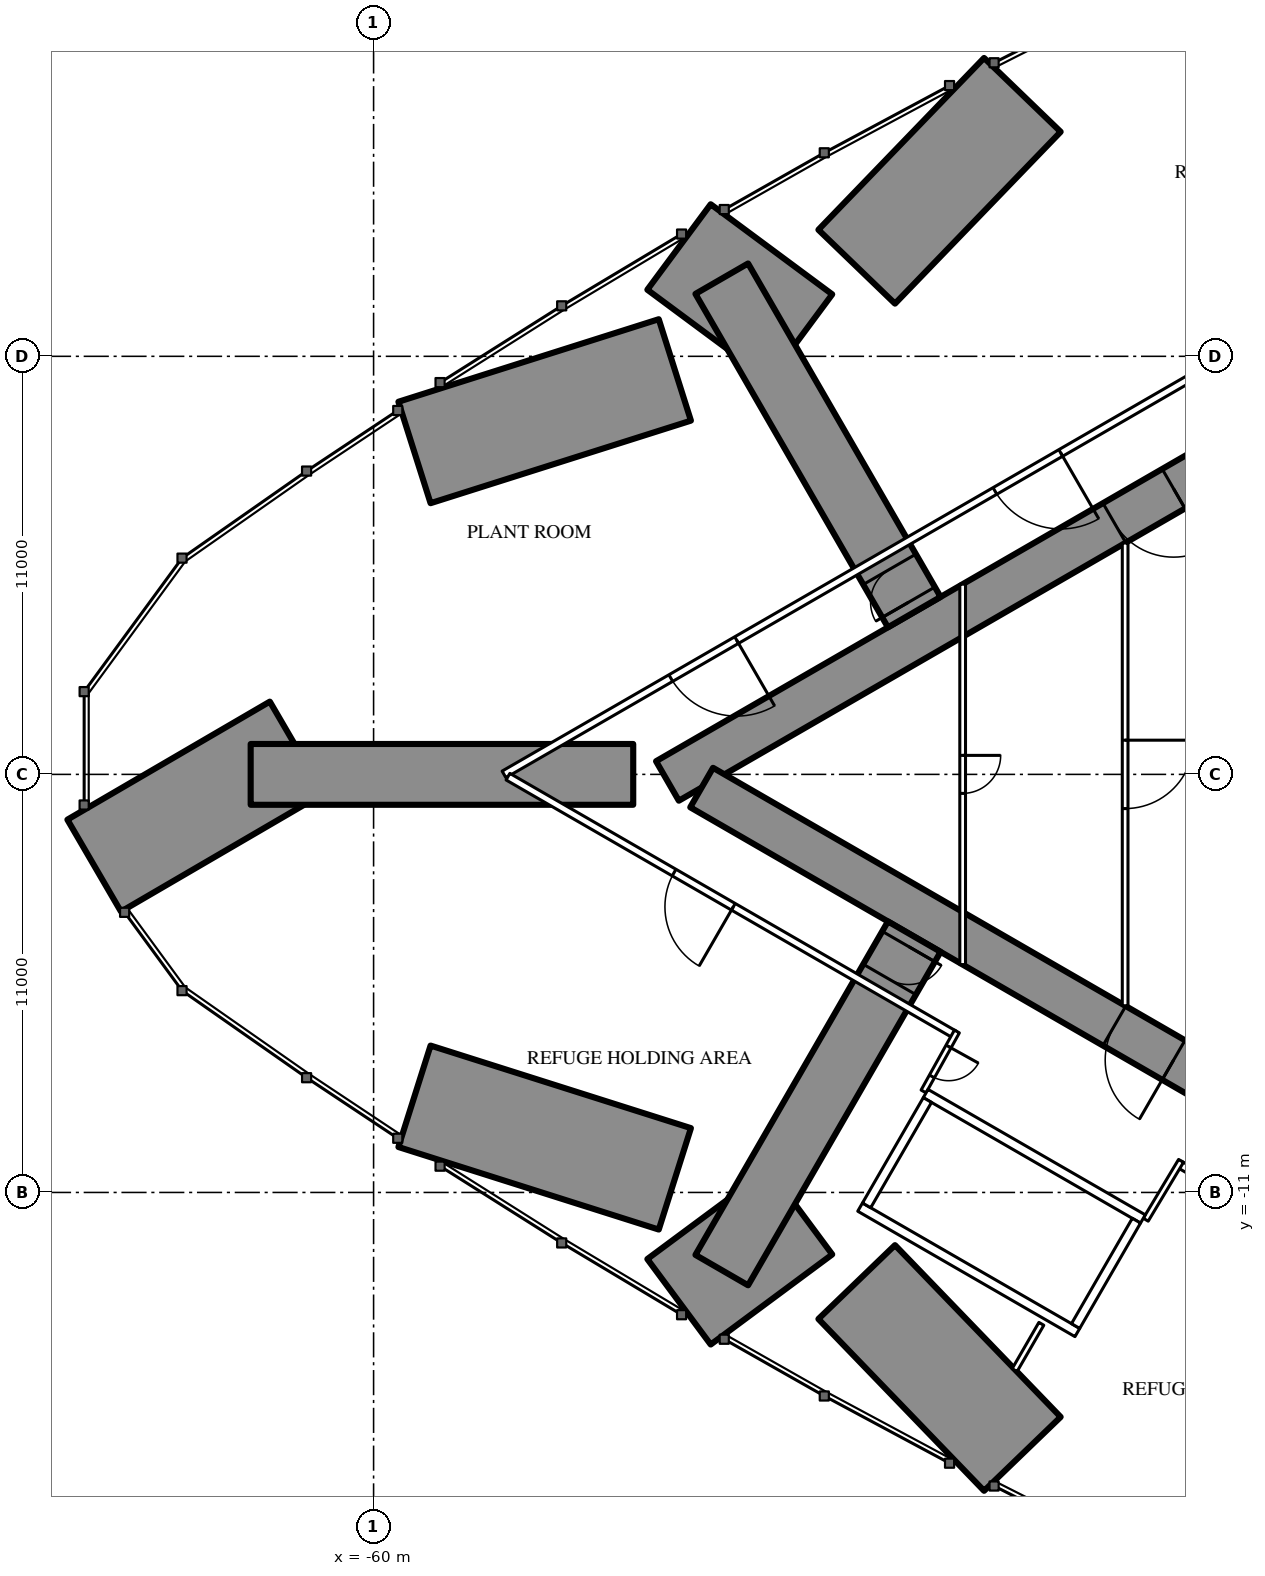
"""IFC4 building model, lengths in metres.
Left out: names, types, materials, properties, quantities, classifications, styles, units other than length and angle.
Written with IfcOpenShell. Run it as: python <this file> out.ifc"""

import sys

from ifc_helpers import new_model, si_unit, direction, frame, frame_2d, origin, place, context, subcontext, project, spatial, rectangle, extrude, element, fill, save


model = new_model("IFC4")
c1 = context("Model", 3, precision=1e-05, world=origin(), true_north=direction((0.0, 1.0)))
c2 = subcontext(c1, "Body", "Model", "MODEL_VIEW")
j1 = project(units=[si_unit("LENGTHUNIT", "METRE"), si_unit("PLANEANGLEUNIT", "RADIAN")], contexts=[c1])
p1 = place(None, origin())
s1 = spatial("IfcSite", under=j1, at=p1, CompositionType="ELEMENT")
p2 = place(p1, origin())
s2 = spatial("IfcBuilding", under=s1, at=p2, CompositionType="ELEMENT")
p3 = place(p2, frame((0.0, 0.0, 205.3)))
s3 = spatial("IfcBuildingStorey", under=s2, at=p3, CompositionType="ELEMENT", Elevation=205.3)
p4 = place(p3, frame((-67.352, -2.4, 0.0), z_axis=(0.0, 0.0, 1.0), x_axis=(0.863922467906, 0.503624830054, 0.0)))
e1 = element("IfcWall", 1, at=p4, inside=s3, PredefinedType="SHEAR", context=c2, shape_type="SweptSolid", body=[
    extrude(rectangle(XDim=6.166, YDim=2.8, at=frame_2d((3.083, 0.0))), origin(), (0.0, 0.0, 1.0), 5.0),
])
p5 = place(p3, frame((-58.924, -8.47, 0.0), z_axis=(0.0, 0.0, 1.0), x_axis=(0.953237559777, -0.302222028698, 0.0)))
e2 = element("IfcWall", 2, at=p5, inside=s3, PredefinedType="SHEAR", context=c2, shape_type="SweptSolid", body=[
    extrude(rectangle(XDim=7.187, YDim=2.8, at=frame_2d((3.594, 0.0))), origin(), (0.0, 0.0, 1.0), 5.0),
])
p6 = place(p3, frame((-51.964, -13.877, 0.0), z_axis=(0.0, 0.0, 1.0), x_axis=(0.80337247009, 0.595476846151, 0.0)))
e3 = element("IfcWall", 3, at=p6, inside=s3, PredefinedType="SHEAR", context=c2, shape_type="SweptSolid", body=[
    extrude(rectangle(XDim=3.981, YDim=2.8, at=frame_2d((1.99, 0.0))), origin(), (0.0, 0.0, 1.0), 5.0),
])
for number, where, z_axis, x_axis in (
    (4, (-42.929, -17.879, 0.0), (0.0, 0.0, 1.0), (-0.694, 0.72, 0.0)),
    (5, (-42.929, 17.879, 0.0), (0.0, 0.0, 1.0), (-0.694, -0.72, 0.0)),
):
    element("IfcWall", number, at=place(p3, frame(where, z_axis=z_axis, x_axis=x_axis)), inside=s3, PredefinedType="SHEAR", context=c2, shape_type="SweptSolid", body=[
        extrude(rectangle(XDim=6.281, YDim=2.8, at=frame_2d((3.141, 0.0))), origin(), (0.0, 0.0, 1.0), 5.0),
    ])
p7 = place(p3, frame((-51.964, 13.877, 0.0), z_axis=(0.0, 0.0, 1.0), x_axis=(0.80337247009, -0.595476846151, 0.0)))
e6 = element("IfcWall", 6, at=p7, inside=s3, PredefinedType="SHEAR", context=c2, shape_type="SweptSolid", body=[
    extrude(rectangle(XDim=3.981, YDim=2.8, at=frame_2d((1.99, 0.0))), origin(), (0.0, 0.0, 1.0), 5.0),
])
p8 = place(p3, frame((-58.924, 8.47, 0.0), z_axis=(0.0, 0.0, 1.0), x_axis=(0.953237559777, 0.302222028698, 0.0)))
e7 = element("IfcWall", 7, at=p8, inside=s3, PredefinedType="SHEAR", context=c2, shape_type="SweptSolid", body=[
    extrude(rectangle(XDim=7.187, YDim=2.8, at=frame_2d((3.594, 0.0))), origin(), (0.0, 0.0, 1.0), 5.0),
])
p9 = place(p3, frame((-27.2, 14.3, 0.0), z_axis=(0.0, 0.0, 1.0), x_axis=(-0.866026593062, -0.499997940104, 0.0)))
e8 = element("IfcWall", 8, at=p9, inside=s3, PredefinedType="SHEAR", context=c2, shape_type="SweptSolid", body=[
    extrude(rectangle(XDim=28.946, YDim=1.2, at=frame_2d((14.473, 0.0))), origin(), (0.0, 0.0, 1.0), 5.0),
])
p10 = place(p9, frame((6.5, 0.0, 0.0)))
e9 = element("IfcOpeningElement", 9, at=p10, cuts=e8, PredefinedType="OPENING", context=c2, shape_type="SweptSolid", body=[
    extrude(rectangle(XDim=1.0, YDim=2.2, at=frame_2d((0.5, 1.1))), frame((0.0, 0.61, 0.0), z_axis=(0.0, -1.0, 0.0), x_axis=(1.0, 0.0, 0.0)), (0.0, 0.0, 1.0), 1.22),
])
p11 = place(p9, frame((13.568, 0.0, 0.0)))
e10 = element("IfcOpeningElement", 10, at=p11, cuts=e8, PredefinedType="OPENING", context=c2, shape_type="SweptSolid", body=[
    extrude(rectangle(XDim=1.8, YDim=2.2, at=frame_2d((0.9, 1.1))), frame((0.0, 0.61, 0.0), z_axis=(0.0, -1.0, 0.0), x_axis=(1.0, 0.0, 0.0)), (0.0, 0.0, 1.0), 1.22),
])
p12 = place(p3, frame((-27.2, -14.3, 0.0), z_axis=(0.0, 0.0, 1.0), x_axis=(-0.866024021859, 0.500002393557, 0.0)))
e11 = element("IfcWall", 11, at=p12, inside=s3, PredefinedType="SHEAR", context=c2, shape_type="SweptSolid", body=[
    extrude(rectangle(XDim=27.907, YDim=1.2, at=frame_2d((13.954, 0.0))), origin(), (0.0, 0.0, 1.0), 5.0),
])
p13 = place(p12, frame((6.5, 0.0, 0.0)))
e12 = element("IfcOpeningElement", 12, at=p13, cuts=e11, PredefinedType="OPENING", context=c2, shape_type="SweptSolid", body=[
    extrude(rectangle(XDim=1.0, YDim=2.2, at=frame_2d((0.5, 1.1))), frame((0.0, 0.61, 0.0), z_axis=(0.0, -1.0, 0.0), x_axis=(1.0, 0.0, 0.0)), (0.0, 0.0, 1.0), 1.22),
])
p14 = place(p12, frame((13.568, 0.0, 0.0)))
e13 = element("IfcOpeningElement", 13, at=p14, cuts=e11, PredefinedType="OPENING", context=c2, shape_type="SweptSolid", body=[
    extrude(rectangle(XDim=1.8, YDim=2.2, at=frame_2d((0.9, 1.1))), frame((0.0, 0.61, 0.0), z_axis=(0.0, -1.0, 0.0), x_axis=(1.0, 0.0, 0.0)), (0.0, 0.0, 1.0), 1.22),
])
p15 = place(p3, frame((-45.773, 4.27, 0.0), z_axis=(0.0, 0.0, 1.0), x_axis=(-0.499995723283, 0.866027872934, 0.0)))
e14 = element("IfcWall", 14, at=p15, inside=s3, PredefinedType="SHEAR", context=c2, shape_type="SweptSolid", body=[
    extrude(rectangle(XDim=10.131, YDim=1.6, at=frame_2d((5.065, 0.0))), origin(), (0.0, 0.0, 1.0), 5.0),
])
p16 = place(p15, frame((0.3, 0.0, 0.0)))
e15 = element("IfcOpeningElement", 15, at=p16, cuts=e14, PredefinedType="OPENING", context=c2, shape_type="SweptSolid", body=[
    extrude(rectangle(XDim=1.0, YDim=2.2, at=frame_2d((0.5, 1.1))), frame((0.0, 0.81, 0.0), z_axis=(0.0, -1.0, 0.0), x_axis=(1.0, 0.0, 0.0)), (0.0, 0.0, 1.0), 1.62),
])
p17 = place(p3, frame((-53.168, 0.0, 0.0), z_axis=(0.0, 0.0, 1.0), x_axis=(-1.0, 0.0, 0.0)))
e16 = element("IfcWall", 16, at=p17, inside=s3, PredefinedType="SHEAR", context=c2, shape_type="SweptSolid", body=[
    extrude(rectangle(XDim=10.066, YDim=1.6, at=frame_2d((5.033, 0.0))), origin(), (0.0, 0.0, 1.0), 5.0),
])
p18 = place(p3, frame((-45.773, -4.27, 0.0), z_axis=(0.0, 0.0, 1.0), x_axis=(-0.499995723283, -0.866027872934, 0.0)))
e17 = element("IfcWall", 17, at=p18, inside=s3, PredefinedType="SHEAR", context=c2, shape_type="SweptSolid", body=[
    extrude(rectangle(XDim=10.131, YDim=1.6, at=frame_2d((5.065, 0.0))), origin(), (0.0, 0.0, 1.0), 5.0),
])
p19 = place(p18, frame((0.3, 0.0, 0.0)))
e18 = element("IfcOpeningElement", 18, at=p19, cuts=e17, PredefinedType="OPENING", context=c2, shape_type="SweptSolid", body=[
    extrude(rectangle(XDim=1.0, YDim=2.2, at=frame_2d((0.5, 1.1))), frame((0.0, 0.81, 0.0), z_axis=(0.0, -1.0, 0.0), x_axis=(1.0, 0.0, 0.0)), (0.0, 0.0, 1.0), 1.62),
])
p20 = place(p3, frame((-27.86, 16.575, 0.0), z_axis=(0.0, 0.0, 1.0), x_axis=(-0.866025533911, -0.499999774615, 0.0)))
e19 = element("IfcWall", 19, at=p20, inside=s3, PredefinedType="PARTITIONING", context=c2, shape_type="SweptSolid", body=[
    extrude(rectangle(XDim=33.149, YDim=0.2, at=frame_2d((16.575, 0.0))), origin(), (0.0, 0.0, 1.0), 4.75),
])
p21 = place(p20, frame((6.051, 0.0, 0.0)))
e20 = element("IfcOpeningElement", 20, at=p21, cuts=e19, PredefinedType="OPENING", context=c2, shape_type="SweptSolid", body=[
    extrude(rectangle(XDim=1.8, YDim=2.2, at=frame_2d((0.9, 1.1))), frame((0.0, 0.11, 0.0), z_axis=(0.0, -1.0, 0.0), x_axis=(1.0, 0.0, 0.0)), (0.0, 0.0, 1.0), 0.22),
])
p22 = place(p20, frame((16.234, 0.0, 0.0)))
e21 = element("IfcOpeningElement", 21, at=p22, cuts=e19, PredefinedType="OPENING", context=c2, shape_type="SweptSolid", body=[
    extrude(rectangle(XDim=2.0, YDim=2.4, at=frame_2d((1.0, 1.2))), frame((0.0, 0.11, 0.0), z_axis=(0.0, -1.0, 0.0), x_axis=(1.0, 0.0, 0.0)), (0.0, 0.0, 1.0), 0.22),
])
p23 = place(p20, frame((26.082, 0.0, 0.0)))
e22 = element("IfcOpeningElement", 22, at=p23, cuts=e19, PredefinedType="OPENING", context=c2, shape_type="SweptSolid", body=[
    extrude(rectangle(XDim=2.0, YDim=2.4, at=frame_2d((1.0, 1.2))), frame((0.0, 0.11, 0.0), z_axis=(0.0, -1.0, 0.0), x_axis=(1.0, 0.0, 0.0)), (0.0, 0.0, 1.0), 0.22),
])
p24 = place(p3, frame((-42.429, -14.457, 0.0), z_axis=(0.0, 0.0, 1.0), x_axis=(-0.5000578829, -0.865991982497, 0.0)))
e23 = element("IfcWall", 23, at=p24, inside=s3, PredefinedType="PARTITIONING", context=c2, shape_type="SweptSolid", body=[
    extrude(rectangle(XDim=1.407, YDim=0.15, at=frame_2d((0.704, 0.0))), origin(), (0.0, 0.0, 1.0), 4.75),
])
p25 = place(p3, frame((-27.86, -16.575, 0.0), z_axis=(0.0, 0.0, 1.0), x_axis=(-0.866027756871, 0.499995924312, 0.0)))
e24 = element("IfcWall", 24, at=p25, inside=s3, PredefinedType="PARTITIONING", context=c2, shape_type="SweptSolid", body=[
    extrude(rectangle(XDim=12.622, YDim=0.2, at=frame_2d((6.311, 0.0))), origin(), (0.0, 0.0, 1.0), 4.75),
])
p26 = place(p25, frame((5.411, 0.0, 0.0)))
e25 = element("IfcOpeningElement", 25, at=p26, cuts=e24, PredefinedType="OPENING", context=c2, shape_type="SweptSolid", body=[
    extrude(rectangle(XDim=1.8, YDim=2.2, at=frame_2d((0.9, 1.1))), frame((0.0, 0.11, 0.0), z_axis=(0.0, -1.0, 0.0), x_axis=(1.0, 0.0, 0.0)), (0.0, 0.0, 1.0), 0.22),
])
p27 = place(p3, frame((-44.715, -6.844, 0.0), z_axis=(0.0, 0.0, 1.0), x_axis=(-0.866025261224, 0.500000246922, 0.0)))
e26 = element("IfcWall", 26, at=p27, inside=s3, PredefinedType="PARTITIONING", context=c2, shape_type="SweptSolid", body=[
    extrude(rectangle(XDim=13.567, YDim=0.2, at=frame_2d((6.783, 0.0))), origin(), (0.0, 0.0, 1.0), 4.75),
])
p28 = place(p27, frame((6.719, 0.0, 0.0)))
e27 = element("IfcOpeningElement", 27, at=p28, cuts=e26, PredefinedType="OPENING", context=c2, shape_type="SweptSolid", body=[
    extrude(rectangle(XDim=1.8, YDim=2.2, at=frame_2d((0.9, 1.1))), frame((0.0, 0.11, 0.0), z_axis=(0.0, -1.0, 0.0), x_axis=(1.0, 0.0, 0.0)), (0.0, 0.0, 1.0), 0.22),
])
p29 = place(p3, frame((-44.652, -6.764, 0.0), z_axis=(0.0, 0.0, 1.0), x_axis=(-0.485528096672, -0.8742210632, 0.0)))
e28 = element("IfcWall", 28, at=p29, inside=s3, PredefinedType="PARTITIONING", context=c2, shape_type="SweptSolid", body=[
    extrude(rectangle(XDim=1.805, YDim=0.15, at=frame_2d((0.903, 0.0))), origin(), (0.0, 0.0, 1.0), 4.75),
])
p30 = place(p29, frame((0.453, 0.0, 0.0)))
e29 = element("IfcOpeningElement", 29, at=p30, cuts=e28, PredefinedType="OPENING", context=c2, shape_type="SweptSolid", body=[
    extrude(rectangle(XDim=0.9, YDim=2.2, at=frame_2d((0.45, 1.1))), frame((0.0, 0.085, 0.0), z_axis=(0.0, -1.0, 0.0), x_axis=(1.0, 0.0, 0.0)), (0.0, 0.0, 1.0), 0.17),
])
p31 = place(p3, frame((-39.683, -11.718, 0.0), z_axis=(0.0, 0.0, 1.0), x_axis=(0.514336634837, 0.857588377991, 0.0)))
e30 = element("IfcWall", 30, at=p31, inside=s3, PredefinedType="PARTITIONING", context=c2, shape_type="SweptSolid", body=[
    extrude(rectangle(XDim=1.805, YDim=0.15, at=frame_2d((0.903, 0.0))), origin(), (0.0, 0.0, 1.0), 4.75),
])
p32 = place(p3, frame((-40.225, 6.087, 0.0), z_axis=(0.0, 0.0, 1.0), x_axis=(0.0, -1.0, 0.0)))
e31 = element("IfcWall", 31, at=p32, inside=s3, PredefinedType="PARTITIONING", context=c2, shape_type="SweptSolid", body=[
    extrude(rectangle(XDim=12.174, YDim=0.15, at=frame_2d((6.087, 0.0))), origin(), (0.0, 0.0, 1.0), 4.75),
])
p33 = place(p32, frame((5.187, 0.0, 0.0)))
e32 = element("IfcOpeningElement", 32, at=p33, cuts=e31, PredefinedType="OPENING", context=c2, shape_type="SweptSolid", body=[
    extrude(rectangle(XDim=1.8, YDim=2.2, at=frame_2d((0.9, 1.1))), frame((0.0, 0.085, 0.0), z_axis=(0.0, -1.0, 0.0), x_axis=(1.0, 0.0, 0.0)), (0.0, 0.0, 1.0), 0.17),
])
p34 = place(p3, frame((-44.5, 5.005, 0.0), z_axis=(0.0, 0.0, 1.0), x_axis=(0.0, -1.0, 0.0)))
e33 = element("IfcWall", 33, at=p34, inside=s3, PredefinedType="PARTITIONING", context=c2, shape_type="SweptSolid", body=[
    extrude(rectangle(XDim=10.009, YDim=0.15, at=frame_2d((5.005, 0.0))), origin(), (0.0, 0.0, 1.0), 3.55),
])
p35 = place(p34, frame((4.505, 0.0, 0.0)))
e34 = element("IfcOpeningElement", 34, at=p35, cuts=e33, PredefinedType="OPENING", context=c2, shape_type="SweptSolid", body=[
    extrude(rectangle(XDim=1.0, YDim=2.2, at=frame_2d((0.5, 1.1))), frame((0.0, 0.085, 0.0), z_axis=(0.0, -1.0, 0.0), x_axis=(1.0, 0.0, 0.0)), (0.0, 0.0, 1.0), 0.17),
])
p36 = place(p3, frame((-39.758, -11.697, 0.0), z_axis=(0.0, 0.0, 1.0), x_axis=(-0.866024194504, 0.500002094529, 0.0)))
e35 = element("IfcWall", 35, at=p36, inside=s3, PredefinedType="PARTITIONING", context=c2, shape_type="SweptSolid", body=[
    extrude(rectangle(XDim=6.6, YDim=0.25, at=frame_2d((3.3, 0.0))), origin(), (0.0, 0.0, 1.0), 4.75),
])
p37 = place(p3, frame((-41.482, -14.686, 0.0), z_axis=(0.0, 0.0, 1.0), x_axis=(-0.86603344179, 0.499986077507, 0.0)))
e36 = element("IfcWall", 36, at=p37, inside=s3, PredefinedType="PARTITIONING", context=c2, shape_type="SweptSolid", body=[
    extrude(rectangle(XDim=6.6, YDim=0.25, at=frame_2d((3.3, 0.0))), origin(), (0.0, 0.0, 1.0), 4.75),
])
for number, where, z_axis, x_axis in (
    (37, (-39.928, -11.743, 0.0), (0.0, 0.0, 1.0), (-0.5, -0.866, 0.0)),
    (38, (-45.428, -8.568, 0.0), (0.0, 0.0, 1.0), (-0.5, -0.866, 0.0)),
):
    element("IfcWall", number, at=place(p3, frame(where, z_axis=z_axis, x_axis=x_axis)), inside=s3, PredefinedType="PARTITIONING", context=c2, shape_type="SweptSolid", body=[
        extrude(rectangle(XDim=3.201, YDim=0.25, at=frame_2d((1.6, 0.0))), origin(), (0.0, 0.0, 1.0), 4.75),
    ])
p38 = place(p16, origin())
e39 = element("IfcDoor", 39, at=p38, inside=s3, OperationType="SINGLE_SWING_LEFT", PredefinedType="DOOR", context=c2, shape_type="SweptSolid", body=[
    extrude(rectangle(XDim=1.0, YDim=2.2, at=frame_2d((0.5, 1.1))), frame((0.0, 0.025, 0.0), z_axis=(0.0, -1.0, 0.0), x_axis=(1.0, 0.0, 0.0)), (0.0, 0.0, 1.0), 0.05),
])
fill(e15, e39)
p39 = place(p19, origin())
e40 = element("IfcDoor", 40, at=p39, inside=s3, OperationType="SINGLE_SWING_LEFT", PredefinedType="DOOR", context=c2, shape_type="SweptSolid", body=[
    extrude(rectangle(XDim=1.0, YDim=2.2, at=frame_2d((0.5, 1.1))), frame((0.0, 0.025, 0.0), z_axis=(0.0, -1.0, 0.0), x_axis=(1.0, 0.0, 0.0)), (0.0, 0.0, 1.0), 0.05),
])
fill(e18, e40)
p40 = place(p22, origin())
e41 = element("IfcDoor", 41, at=p40, inside=s3, OperationType="DOUBLE_DOOR_SINGLE_SWING", PredefinedType="DOOR", context=c2, shape_type="SweptSolid", body=[
    extrude(rectangle(XDim=2.0, YDim=2.4, at=frame_2d((1.0, 1.2))), frame((0.0, 0.025, 0.0), z_axis=(0.0, -1.0, 0.0), x_axis=(1.0, 0.0, 0.0)), (0.0, 0.0, 1.0), 0.05),
])
fill(e21, e41)
p41 = place(p23, origin())
e42 = element("IfcDoor", 42, at=p41, inside=s3, OperationType="DOUBLE_DOOR_SINGLE_SWING", PredefinedType="DOOR", context=c2, shape_type="SweptSolid", body=[
    extrude(rectangle(XDim=2.0, YDim=2.4, at=frame_2d((1.0, 1.2))), frame((0.0, 0.025, 0.0), z_axis=(0.0, -1.0, 0.0), x_axis=(1.0, 0.0, 0.0)), (0.0, 0.0, 1.0), 0.05),
])
fill(e22, e42)
p42 = place(p28, origin())
e43 = element("IfcDoor", 43, at=p42, inside=s3, OperationType="DOUBLE_DOOR_SINGLE_SWING", PredefinedType="DOOR", context=c2, shape_type="SweptSolid", body=[
    extrude(rectangle(XDim=1.8, YDim=2.2, at=frame_2d((0.9, 1.1))), frame((0.0, 0.025, 0.0), z_axis=(0.0, -1.0, 0.0), x_axis=(1.0, 0.0, 0.0)), (0.0, 0.0, 1.0), 0.05),
])
fill(e27, e43)
p43 = place(p30, origin())
e44 = element("IfcDoor", 44, at=p43, inside=s3, OperationType="SINGLE_SWING_LEFT", PredefinedType="DOOR", context=c2, shape_type="SweptSolid", body=[
    extrude(rectangle(XDim=0.9, YDim=2.2, at=frame_2d((0.45, 1.1))), frame((0.0, 0.025, 0.0), z_axis=(0.0, -1.0, 0.0), x_axis=(1.0, 0.0, 0.0)), (0.0, 0.0, 1.0), 0.05),
])
fill(e29, e44)
p44 = place(p33, origin())
e45 = element("IfcDoor", 45, at=p44, inside=s3, OperationType="DOUBLE_DOOR_SINGLE_SWING", PredefinedType="DOOR", context=c2, shape_type="SweptSolid", body=[
    extrude(rectangle(XDim=1.8, YDim=2.2, at=frame_2d((0.9, 1.1))), frame((0.0, 0.025, 0.0), z_axis=(0.0, -1.0, 0.0), x_axis=(1.0, 0.0, 0.0)), (0.0, 0.0, 1.0), 0.05),
])
fill(e32, e45)
p45 = place(p35, origin())
e46 = element("IfcDoor", 46, at=p45, inside=s3, OperationType="SINGLE_SWING_LEFT", PredefinedType="DOOR", context=c2, shape_type="SweptSolid", body=[
    extrude(rectangle(XDim=1.0, YDim=2.2, at=frame_2d((0.5, 1.1))), frame((0.0, 0.025, 0.0), z_axis=(0.0, -1.0, 0.0), x_axis=(1.0, 0.0, 0.0)), (0.0, 0.0, 1.0), 0.05),
])
fill(e34, e46)
p46 = place(p11, origin())
e47 = element("IfcDoor", 47, at=p46, inside=s3, OperationType="DOUBLE_DOOR_SINGLE_SWING", PredefinedType="DOOR", context=c2, shape_type="SweptSolid", body=[
    extrude(rectangle(XDim=1.8, YDim=2.2, at=frame_2d((0.9, 1.1))), frame((0.0, 0.025, 0.0), z_axis=(0.0, -1.0, 0.0), x_axis=(1.0, 0.0, 0.0)), (0.0, 0.0, 1.0), 0.05),
])
fill(e10, e47)
p47 = place(p14, origin())
e48 = element("IfcDoor", 48, at=p47, inside=s3, OperationType="DOUBLE_DOOR_SINGLE_SWING", PredefinedType="DOOR", context=c2, shape_type="SweptSolid", body=[
    extrude(rectangle(XDim=1.8, YDim=2.2, at=frame_2d((0.9, 1.1))), frame((0.0, 0.025, 0.0), z_axis=(0.0, -1.0, 0.0), x_axis=(1.0, 0.0, 0.0)), (0.0, 0.0, 1.0), 0.05),
])
fill(e13, e48)
save(model, sys.argv[1])
